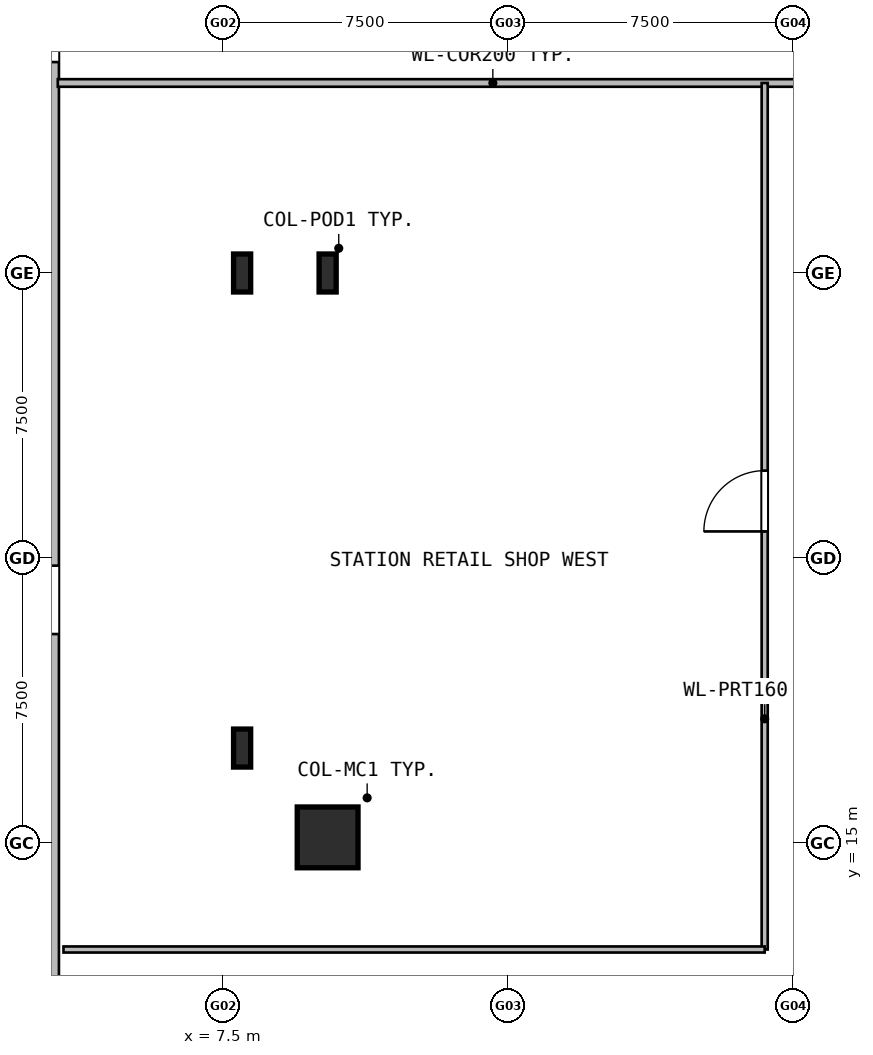
"""IFC4 building model, lengths in metres.
Left out: names, types, materials, properties, quantities, classifications, styles, units other than length and angle.
Written with IfcOpenShell. Run it as: python <this file> out.ifc"""

import sys

from ifc_helpers import new_model, si_unit, direction, frame, frame_2d, origin, origin_2d, place, context, subcontext, project, spatial, rectangle, hollow_rectangle, i_section, extrude, element, fill, save


model = new_model("IFC4")
c1 = context("Model", 3, precision=1e-05, world=origin(), true_north=direction((0.0, 1.0)))
c2 = subcontext(c1, "Body", "Model", "MODEL_VIEW")
j1 = project(units=[si_unit("LENGTHUNIT", "METRE"), si_unit("PLANEANGLEUNIT", "RADIAN")], contexts=[c1])
p1 = place(None, origin())
s1 = spatial("IfcSite", under=j1, at=p1, CompositionType="ELEMENT")
p2 = place(p1, origin())
s2 = spatial("IfcBuilding", under=s1, at=p2, CompositionType="ELEMENT")
p3 = place(p2, origin())
s3 = spatial("IfcBuildingStorey", under=s2, at=p3, CompositionType="ELEMENT", Elevation=0.0)
p4 = place(p3, frame((10.25, 15.15, 0.0), z_axis=(0.0, 0.0, 1.0), x_axis=(1.0, 0.0, 0.0)))
e1 = element("IfcColumn", 1, at=p4, inside=s3, PredefinedType="COLUMN", context=c2, shape_type="SweptSolid", body=[
    extrude(hollow_rectangle(XDim=1.6, YDim=1.6, WallThickness=0.04, at=origin_2d()), origin(), (0.0, 0.0, 1.0), 6.0),
])
for number, where, z_axis, x_axis in (
    (2, (10.25, 30.0, 0.0), (0.0, 0.0, 1.0), (1.0, 0.0, 0.0)),
    (3, (8.0, 17.5, 0.0), (0.0, 0.0, 1.0), (1.0, 0.0, 0.0)),
    (4, (8.0, 30.0, 0.0), (0.0, 0.0, 1.0), (1.0, 0.0, 0.0)),
):
    element("IfcColumn", number, at=place(p3, frame(where, z_axis=z_axis, x_axis=x_axis)), inside=s3, PredefinedType="COLUMN", context=c2, shape_type="SweptSolid", body=[
        extrude(i_section(OverallWidth=0.45, OverallDepth=1.0, WebThickness=0.022, FlangeThickness=0.04, at=origin_2d()), origin(), (0.0, 0.0, 1.0), 6.0),
    ])
p5 = place(p3, frame((3.0, 4.5, 0.0), z_axis=(0.0, 0.0, 1.0), x_axis=(0.0, 1.0, 0.0)))
e5 = element("IfcWall", 5, at=p5, inside=s3, PredefinedType="SOLIDWALL", context=c2, shape_type="SweptSolid", body=[
    extrude(rectangle(XDim=51.0, YDim=0.36, at=frame_2d((25.5, 0.0))), origin(), (0.0, 0.0, 1.0), 5.68),
])
p6 = place(p5, frame((31.05, 0.0, 0.0)))
e6 = element("IfcOpeningElement", 6, at=p6, cuts=e5, PredefinedType="OPENING", context=c2, shape_type="SweptSolid", body=[
    extrude(rectangle(XDim=1.8, YDim=2.3, at=frame_2d((0.9, 1.15))), frame((0.0, 0.19, 0.0), z_axis=(0.0, -1.0, 0.0), x_axis=(1.0, 0.0, 0.0)), (0.0, 0.0, 1.0), 0.38),
])
p7 = place(p5, frame((16.0, 0.0, 0.0)))
e7 = element("IfcOpeningElement", 7, at=p7, cuts=e5, PredefinedType="OPENING", context=c2, shape_type="SweptSolid", body=[
    extrude(rectangle(XDim=1.8, YDim=2.3, at=frame_2d((0.9, 1.15))), frame((0.0, 0.19, 0.0), z_axis=(0.0, -1.0, 0.0), x_axis=(1.0, 0.0, 0.0)), (0.0, 0.0, 1.0), 0.38),
])
p8 = place(p3, frame((3.15, 35.0, 0.0), z_axis=(0.0, 0.0, 1.0), x_axis=(1.0, 0.0, 0.0)))
e8 = element("IfcWall", 8, at=p8, inside=s3, PredefinedType="PARTITIONING", context=c2, shape_type="SweptSolid", body=[
    extrude(rectangle(XDim=24.9, YDim=0.2, at=frame_2d((12.45, 0.0))), origin(), (0.0, 0.0, 1.0), 5.68),
])
p9 = place(p8, frame((21.65, 0.0, 0.0)))
e9 = element("IfcOpeningElement", 9, at=p9, cuts=e8, PredefinedType="OPENING", context=c2, shape_type="SweptSolid", body=[
    extrude(rectangle(XDim=1.1, YDim=2.15, at=frame_2d((0.55, 1.075))), frame((0.0, 0.11, 0.0), z_axis=(0.0, -1.0, 0.0), x_axis=(1.0, 0.0, 0.0)), (0.0, 0.0, 1.0), 0.22),
])
p10 = place(p3, frame((21.75, 12.2, 0.0), z_axis=(0.0, 0.0, 1.0), x_axis=(0.0, 1.0, 0.0)))
e10 = element("IfcWall", 10, at=p10, inside=s3, PredefinedType="PARTITIONING", context=c2, shape_type="SweptSolid", body=[
    extrude(rectangle(XDim=22.8, YDim=0.16, at=frame_2d((11.4, 0.0))), origin(), (0.0, 0.0, 1.0), 5.68),
])
p11 = place(p10, frame((11.0, 0.0, 0.0)))
e11 = element("IfcOpeningElement", 11, at=p11, cuts=e10, PredefinedType="OPENING", context=c2, shape_type="SweptSolid", body=[
    extrude(rectangle(XDim=1.6, YDim=2.2, at=frame_2d((0.8, 1.1))), frame((0.0, 0.09, 0.0), z_axis=(0.0, -1.0, 0.0), x_axis=(1.0, 0.0, 0.0)), (0.0, 0.0, 1.0), 0.18),
])
p12 = place(p3, frame((3.3, 12.2, 0.0), z_axis=(0.0, 0.0, 1.0), x_axis=(1.0, 0.0, 0.0)))
e12 = element("IfcWall", 12, at=p12, inside=s3, PredefinedType="PARTITIONING", context=c2, shape_type="SweptSolid", body=[
    extrude(rectangle(XDim=18.45, YDim=0.16, at=frame_2d((9.225, 0.0))), origin(), (0.0, 0.0, 1.0), 5.68),
])
p13 = place(p6, origin())
e13 = element("IfcDoor", 13, at=p13, inside=s3, OperationType="DOUBLE_DOOR_SINGLE_SWING", PredefinedType="DOOR", context=c2, shape_type="SweptSolid", body=[
    extrude(rectangle(XDim=1.8, YDim=2.3, at=frame_2d((0.9, 1.15))), frame((0.0, 0.025, 0.0), z_axis=(0.0, -1.0, 0.0), x_axis=(1.0, 0.0, 0.0)), (0.0, 0.0, 1.0), 0.05),
])
fill(e6, e13)
p14 = place(p7, origin())
e14 = element("IfcDoor", 14, at=p14, inside=s3, OperationType="DOUBLE_DOOR_SINGLE_SWING", PredefinedType="DOOR", context=c2, shape_type="SweptSolid", body=[
    extrude(rectangle(XDim=1.8, YDim=2.3, at=frame_2d((0.9, 1.15))), frame((0.0, 0.025, 0.0), z_axis=(0.0, -1.0, 0.0), x_axis=(1.0, 0.0, 0.0)), (0.0, 0.0, 1.0), 0.05),
])
fill(e7, e14)
p15 = place(p11, origin())
e15 = element("IfcDoor", 15, at=p15, inside=s3, OperationType="DOUBLE_DOOR_SINGLE_SWING", PredefinedType="DOOR", context=c2, shape_type="SweptSolid", body=[
    extrude(rectangle(XDim=1.6, YDim=2.2, at=frame_2d((0.8, 1.1))), frame((0.0, 0.025, 0.0), z_axis=(0.0, -1.0, 0.0), x_axis=(1.0, 0.0, 0.0)), (0.0, 0.0, 1.0), 0.05),
])
fill(e11, e15)
save(model, sys.argv[1])
